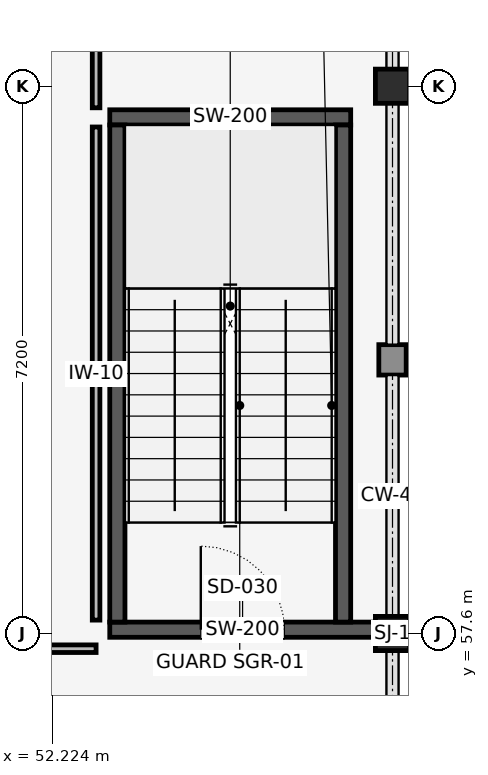
"""IFC4 building model, lengths in metres.
Left out: names, types, materials, properties, quantities, classifications, styles, units other than length and angle.
Written with IfcOpenShell. Run it as: python <this file> out.ifc"""

import sys

from ifc_helpers import new_model, si_unit, direction, frame, frame_2d, origin, origin_2d, place, context, subcontext, project, spatial, rectangle, extrude, element, fill, save


model = new_model("IFC4")
c1 = context("Model", 3, precision=1e-05, world=origin(), true_north=direction((0.0, 1.0)))
c2 = subcontext(c1, "Body", "Model", "MODEL_VIEW")
j1 = project(units=[si_unit("LENGTHUNIT", "METRE"), si_unit("PLANEANGLEUNIT", "RADIAN")], contexts=[c1])
p1 = place(None, origin())
s1 = spatial("IfcSite", under=j1, at=p1, CompositionType="ELEMENT")
p2 = place(p1, origin())
s2 = spatial("IfcBuilding", under=s1, at=p2, CompositionType="ELEMENT")
p3 = place(p2, frame((0.0, 0.0, 5.4)))
s3 = spatial("IfcBuildingStorey", under=s2, at=p3, CompositionType="ELEMENT", Elevation=5.4)
for number, where, z_axis, x_axis in (
    (1, (56.7, 57.6, 0.0), (0.0, 0.0, 1.0), (1.0, 0.0, 0.0)),
    (2, (56.7, 64.8, 0.0), (0.0, 0.0, 1.0), (1.0, 0.0, 0.0)),
):
    element("IfcColumn", number, at=place(p3, frame(where, z_axis=z_axis, x_axis=x_axis)), inside=s3, PredefinedType="COLUMN", context=c2, shape_type="SweptSolid", body=[
        extrude(rectangle(XDim=0.45, YDim=0.45, at=origin_2d()), origin(), (0.0, 0.0, 1.0), 4.2),
    ])
p4 = place(p3, frame((52.98, 57.65, 0.0), z_axis=(0.0, 0.0, 1.0), x_axis=(1.0, 0.0, 0.0)))
e3 = element("IfcWall", 3, at=p4, inside=s3, PredefinedType="SHEAR", context=c2, shape_type="SweptSolid", body=[
    extrude(rectangle(XDim=3.495, YDim=0.2, at=frame_2d((1.748, 0.0))), origin(), (0.0, 0.0, 1.0), 3.95),
])
p5 = place(p4, frame((1.198, 0.0, 0.0)))
e4 = element("IfcOpeningElement", 4, at=p5, cuts=e3, PredefinedType="OPENING", context=c2, shape_type="SweptSolid", body=[
    extrude(rectangle(XDim=1.1, YDim=2.15, at=frame_2d((0.55, 1.075))), frame((0.0, 0.112, 0.0), z_axis=(0.0, -1.0, 0.0), x_axis=(1.0, 0.0, 0.0)), (0.0, 0.0, 1.0), 0.224),
])
p6 = place(p3, frame((52.98, 64.39, 0.0), z_axis=(0.0, 0.0, 1.0), x_axis=(1.0, 0.0, 0.0)))
e5 = element("IfcWall", 5, at=p6, inside=s3, PredefinedType="SHEAR", context=c2, shape_type="SweptSolid", body=[
    extrude(rectangle(XDim=3.17, YDim=0.2, at=frame_2d((1.585, 0.0))), origin(), (0.0, 0.0, 1.0), 3.95),
])
for number, where, z_axis, x_axis in (
    (6, (53.08, 57.75, 0.0), (0.0, 0.0, 1.0), (0.0, 1.0, 0.0)),
    (7, (56.05, 57.75, 0.0), (0.0, 0.0, 1.0), (0.0, 1.0, 0.0)),
):
    element("IfcWall", number, at=place(p3, frame(where, z_axis=z_axis, x_axis=x_axis)), inside=s3, PredefinedType="SHEAR", context=c2, shape_type="SweptSolid", body=[
        extrude(rectangle(XDim=6.54, YDim=0.2, at=frame_2d((3.27, 0.0))), origin(), (0.0, 0.0, 1.0), 3.95),
    ])
p7 = place(p3, frame((56.7, 61.0, 0.0), z_axis=(0.0, 0.0, 1.0), x_axis=(0.0, 1.0, 0.0)))
e8 = element("IfcWall", 8, at=p7, inside=s3, PredefinedType="SOLIDWALL", context=c2, shape_type="SweptSolid", body=[
    extrude(rectangle(XDim=0.4, YDim=0.36, at=frame_2d((0.2, 0.0))), origin(), (0.0, 0.0, 1.0), 3.34),
])
p8 = place(p3, frame((50.665, 57.4, 0.0), z_axis=(0.0, 0.0, 1.0), x_axis=(1.0, 0.0, 0.0)))
e9 = element("IfcWall", 9, at=p8, inside=s3, PredefinedType="PARTITIONING", context=c2, shape_type="SweptSolid", body=[
    extrude(rectangle(XDim=2.135, YDim=0.1, at=frame_2d((1.067, 0.0))), origin(), (0.0, 0.0, 1.0), 3.92),
])
p9 = place(p3, frame((52.8, 57.776, 0.0), z_axis=(0.0, 0.0, 1.0), x_axis=(0.0, 1.0, 0.0)))
e10 = element("IfcWall", 10, at=p9, inside=s3, PredefinedType="PARTITIONING", context=c2, shape_type="SweptSolid", body=[
    extrude(rectangle(XDim=6.488, YDim=0.1, at=frame_2d((3.244, 0.0))), origin(), (0.0, 0.0, 1.0), 3.92),
])
p10 = place(p3, frame((52.8, 64.516, 0.0), z_axis=(0.0, 0.0, 1.0), x_axis=(0.0, 1.0, 0.0)))
e11 = element("IfcWall", 11, at=p10, inside=s3, PredefinedType="PARTITIONING", context=c2, shape_type="SweptSolid", body=[
    extrude(rectangle(XDim=7.484, YDim=0.1, at=frame_2d((3.742, 0.0))), origin(), (0.0, 0.0, 1.0), 3.188),
])
p11 = place(p5, origin())
e12 = element("IfcDoor", 12, at=p11, inside=s3, OperationType="SINGLE_SWING_LEFT", PredefinedType="DOOR", context=c2, shape_type="SweptSolid", body=[
    extrude(rectangle(XDim=1.1, YDim=2.15, at=frame_2d((0.55, 1.075))), frame((0.0, 0.025, 0.0), z_axis=(0.0, -1.0, 0.0), x_axis=(1.0, 0.0, 0.0)), (0.0, 0.0, 1.0), 0.05),
])
fill(e4, e12)
save(model, sys.argv[1])
